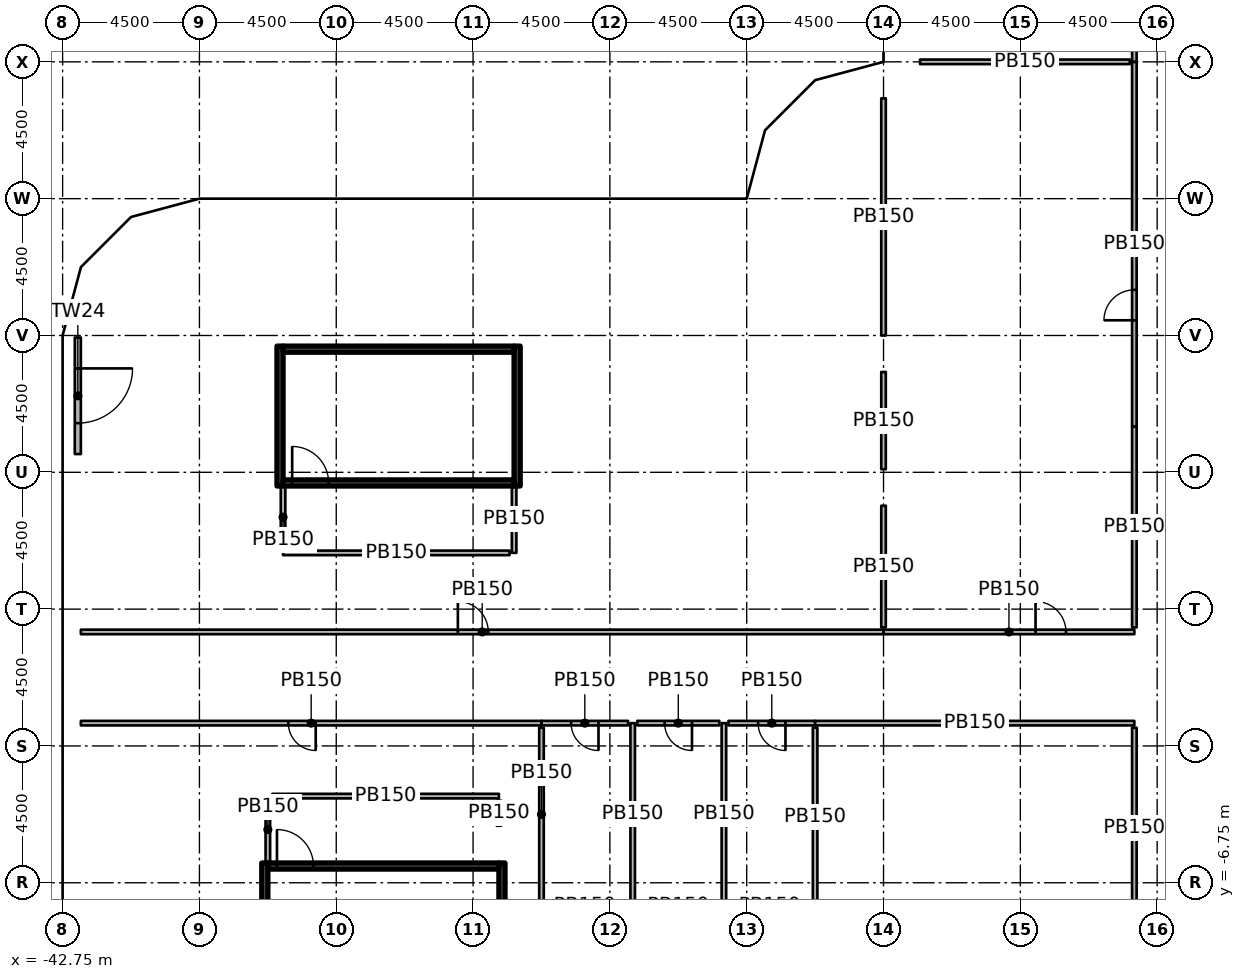
"""IFC4 building model, lengths in metres.
Left out: names, types, materials, properties, quantities, classifications, styles, units other than length and angle.
Written with IfcOpenShell. Run it as: python <this file> out.ifc"""

import sys

from ifc_helpers import new_model, si_unit, direction, frame, frame_2d, origin, origin_2d, place, context, subcontext, project, spatial, rectangle, extrude, element, fill, save


model = new_model("IFC4")
c1 = context("Model", 3, precision=1e-05, world=origin(), true_north=direction((0.0, 1.0)))
c2 = subcontext(c1, "Body", "Model", "MODEL_VIEW")
j1 = project(units=[si_unit("LENGTHUNIT", "METRE"), si_unit("PLANEANGLEUNIT", "RADIAN")], contexts=[c1])
p1 = place(None, origin())
s1 = spatial("IfcSite", under=j1, at=p1, CompositionType="ELEMENT")
p2 = place(p1, origin())
s2 = spatial("IfcBuilding", under=s1, at=p2, CompositionType="ELEMENT")
p3 = place(p2, frame((0.0, 0.0, 17.0)))
s3 = spatial("IfcBuildingStorey", under=s2, at=p3, CompositionType="ELEMENT", Elevation=17.0)
for number, where, z_axis, x_axis in (
    (1, (-42.15, 6.75, 0.0), (0.0, 0.0, 1.0), (1.0, 0.0, 0.0)),
    (2, (-37.65, 2.25, 0.0), (0.0, 0.0, 1.0), (1.0, 0.0, 0.0)),
    (3, (-38.25, 14.97, 0.0), (0.0, 0.0, 1.0), (1.0, 0.0, 0.0)),
    (4, (-33.11, -2.25, 0.0), (0.0, 0.0, 1.0), (1.0, 0.0, 0.0)),
    (5, (-33.11, 2.25, 0.0), (0.0, 0.0, 1.0), (1.0, 0.0, 0.0)),
    (6, (-28.908, -5.475, 0.0), (0.0, 0.0, 1.0), (1.0, 0.0, 0.0)),
    (7, (-28.908, 5.475, 0.0), (0.0, 0.0, 1.0), (1.0, 0.0, 0.0)),
    (8, (-24.75, -6.25, 0.0), (0.0, 0.0, 1.0), (1.0, 0.0, 0.0)),
    (9, (-24.75, 6.25, 0.0), (0.0, 0.0, 1.0), (1.0, 0.0, 0.0)),
    (10, (-24.75, 15.15, 0.0), (0.0, 0.0, 1.0), (1.0, 0.0, 0.0)),
    (11, (-20.25, -6.11, 0.0), (0.0, 0.0, 1.0), (1.0, 0.0, 0.0)),
    (12, (-20.25, 6.11, 0.0), (0.0, 0.0, 1.0), (1.0, 0.0, 0.0)),
    (13, (-20.25, 10.65, 0.0), (0.0, 0.0, 1.0), (1.0, 0.0, 0.0)),
    (14, (-19.65, 15.15, 0.0), (0.0, 0.0, 1.0), (1.0, 0.0, 0.0)),
    (15, (-15.75, -6.25, 0.0), (0.0, 0.0, 1.0), (1.0, 0.0, 0.0)),
    (16, (-15.75, 6.25, 0.0), (0.0, 0.0, 1.0), (1.0, 0.0, 0.0)),
    (17, (-15.15, 10.65, 0.0), (0.0, 0.0, 1.0), (1.0, 0.0, 0.0)),
    (18, (-15.15, 19.65, 0.0), (0.0, 0.0, 1.0), (1.0, 0.0, 0.0)),
    (19, (-10.75, -6.25, 0.0), (0.0, 0.0, 1.0), (1.0, 0.0, 0.0)),
    (20, (-10.75, 6.25, 0.0), (0.0, 0.0, 1.0), (1.0, 0.0, 0.0)),
    (21, (-10.65, 15.15, 0.0), (0.0, 0.0, 1.0), (1.0, 0.0, 0.0)),
    (22, (-6.25, -6.25, 0.0), (0.0, 0.0, 1.0), (1.0, 0.0, 0.0)),
    (23, (-6.25, 6.25, 0.0), (0.0, 0.0, 1.0), (1.0, 0.0, 0.0)),
    (24, (-6.25, 10.75, 0.0), (0.0, 0.0, 1.0), (1.0, 0.0, 0.0)),
    (25, (-6.25, 15.75, 0.0), (0.0, 0.0, 1.0), (1.0, 0.0, 0.0)),
    (26, (-6.25, 20.25, 0.0), (0.0, 0.0, 1.0), (1.0, 0.0, 0.0)),
):
    element("IfcColumn", number, at=place(p3, frame(where, z_axis=z_axis, x_axis=x_axis)), inside=s3, PredefinedType="COLUMN", context=c2, shape_type="SweptSolid", body=[
        extrude(rectangle(XDim=1.2, YDim=1.2, at=origin_2d()), origin(), (0.0, 0.0, 1.0), 4.55),
    ])
p4 = place(p3, frame((-42.25, 11.184, 0.0), z_axis=(0.0, 0.0, 1.0), x_axis=(0.0, -1.0, 0.0)))
e27 = element("IfcWall", 27, at=p4, inside=s3, PredefinedType="SOLIDWALL", context=c2, shape_type="SweptSolid", body=[
    extrude(rectangle(XDim=3.834, YDim=0.2, at=frame_2d((1.917, 0.0))), origin(), (0.0, 0.0, 1.0), 4.55),
])
p5 = place(p4, frame((1.017, 0.0, 0.0)))
e28 = element("IfcOpeningElement", 28, at=p5, cuts=e27, PredefinedType="OPENING", context=c2, shape_type="SweptSolid", body=[
    extrude(rectangle(XDim=1.8, YDim=2.4, at=frame_2d((0.9, 1.2))), frame((0.0, 0.11, 0.0), z_axis=(0.0, -1.0, 0.0), x_axis=(1.0, 0.0, 0.0)), (0.0, 0.0, 1.0), 0.22),
])
for number, where, z_axis, x_axis in (
    (29, (-36.1, -10.7, 0.0), (0.0, 0.0, 1.0), (0.0, 1.0, 0.0)),
    (30, (-28.3, -10.7, 0.0), (0.0, 0.0, 1.0), (0.0, 1.0, 0.0)),
):
    element("IfcWall", number, at=place(p3, frame(where, z_axis=z_axis, x_axis=x_axis)), inside=s3, PredefinedType="SHEAR", context=c2, shape_type="SweptSolid", body=[
        extrude(rectangle(XDim=4.6, YDim=0.2, at=frame_2d((2.3, 0.0))), origin(), (0.0, 0.0, 1.0), 4.55),
    ])
p6 = place(p3, frame((-36.0, -6.2, 0.0), z_axis=(0.0, 0.0, 1.0), x_axis=(1.0, 0.0, 0.0)))
e31 = element("IfcWall", 31, at=p6, inside=s3, PredefinedType="SHEAR", context=c2, shape_type="SweptSolid", body=[
    extrude(rectangle(XDim=7.6, YDim=0.2, at=frame_2d((3.8, 0.0))), origin(), (0.0, 0.0, 1.0), 4.55),
])
p7 = place(p6, frame((0.3, 0.0, 0.0)))
e32 = element("IfcOpeningElement", 32, at=p7, cuts=e31, PredefinedType="OPENING", context=c2, shape_type="SweptSolid", body=[
    extrude(rectangle(XDim=1.2, YDim=2.1, at=frame_2d((0.6, 1.05))), frame((0.0, 0.11, 0.0), z_axis=(0.0, -1.0, 0.0), x_axis=(1.0, 0.0, 0.0)), (0.0, 0.0, 1.0), 0.22),
])
for number, where, z_axis, x_axis in (
    (33, (-35.6, 6.3, 0.0), (0.0, 0.0, 1.0), (0.0, 1.0, 0.0)),
    (34, (-27.8, 6.3, 0.0), (0.0, 0.0, 1.0), (0.0, 1.0, 0.0)),
):
    element("IfcWall", number, at=place(p3, frame(where, z_axis=z_axis, x_axis=x_axis)), inside=s3, PredefinedType="SHEAR", context=c2, shape_type="SweptSolid", body=[
        extrude(rectangle(XDim=4.6, YDim=0.2, at=frame_2d((2.3, 0.0))), origin(), (0.0, 0.0, 1.0), 4.55),
    ])
p8 = place(p3, frame((-35.5, 6.4, 0.0), z_axis=(0.0, 0.0, 1.0), x_axis=(1.0, 0.0, 0.0)))
e35 = element("IfcWall", 35, at=p8, inside=s3, PredefinedType="SHEAR", context=c2, shape_type="SweptSolid", body=[
    extrude(rectangle(XDim=7.6, YDim=0.2, at=frame_2d((3.8, 0.0))), origin(), (0.0, 0.0, 1.0), 4.55),
])
p9 = place(p8, frame((0.3, 0.0, 0.0)))
e36 = element("IfcOpeningElement", 36, at=p9, cuts=e35, PredefinedType="OPENING", context=c2, shape_type="SweptSolid", body=[
    extrude(rectangle(XDim=1.2, YDim=2.1, at=frame_2d((0.6, 1.05))), frame((0.0, 0.11, 0.0), z_axis=(0.0, -1.0, 0.0), x_axis=(1.0, 0.0, 0.0)), (0.0, 0.0, 1.0), 0.22),
])
p10 = place(p3, frame((-35.5, 10.8, 0.0), z_axis=(0.0, 0.0, 1.0), x_axis=(1.0, 0.0, 0.0)))
e37 = element("IfcWall", 37, at=p10, inside=s3, PredefinedType="SHEAR", context=c2, shape_type="SweptSolid", body=[
    extrude(rectangle(XDim=7.6, YDim=0.2, at=frame_2d((3.8, 0.0))), origin(), (0.0, 0.0, 1.0), 4.55),
])
p11 = place(p3, frame((-36.0, -6.1, 0.0), z_axis=(0.0, 0.0, 1.0), x_axis=(0.0, 1.0, 0.0)))
e38 = element("IfcWall", 38, at=p11, inside=s3, PredefinedType="PARTITIONING", context=c2, shape_type="SweptSolid", body=[
    extrude(rectangle(XDim=2.2, YDim=0.15, at=frame_2d((1.1, 0.0))), origin(), (0.0, 0.0, 1.0), 4.55),
])
p12 = place(p3, frame((-35.85, -3.9, 0.0), z_axis=(0.0, 0.0, 1.0), x_axis=(1.0, 0.0, 0.0)))
e39 = element("IfcWall", 39, at=p12, inside=s3, PredefinedType="PARTITIONING", context=c2, shape_type="SweptSolid", body=[
    extrude(rectangle(XDim=7.45, YDim=0.15, at=frame_2d((3.725, 0.0))), origin(), (0.0, 0.0, 1.0), 4.55),
])
p13 = place(p3, frame((-28.4, -4.05, 0.0), z_axis=(0.0, 0.0, 1.0), x_axis=(0.0, -1.0, 0.0)))
e40 = element("IfcWall", 40, at=p13, inside=s3, PredefinedType="PARTITIONING", context=c2, shape_type="SweptSolid", body=[
    extrude(rectangle(XDim=0.825, YDim=0.15, at=frame_2d((0.413, 0.0))), origin(), (0.0, 0.0, 1.0), 4.55),
])
p14 = place(p3, frame((-27.9, 6.3, 0.0), z_axis=(0.0, 0.0, 1.0), x_axis=(0.0, -1.0, 0.0)))
e41 = element("IfcWall", 41, at=p14, inside=s3, PredefinedType="PARTITIONING", context=c2, shape_type="SweptSolid", body=[
    extrude(rectangle(XDim=2.2, YDim=0.15, at=frame_2d((1.1, 0.0))), origin(), (0.0, 0.0, 1.0), 4.55),
])
p15 = place(p3, frame((-28.05, 4.1, 0.0), z_axis=(0.0, 0.0, 1.0), x_axis=(-1.0, 0.0, 0.0)))
e42 = element("IfcWall", 42, at=p15, inside=s3, PredefinedType="PARTITIONING", context=c2, shape_type="SweptSolid", body=[
    extrude(rectangle(XDim=7.45, YDim=0.15, at=frame_2d((3.725, 0.0))), origin(), (0.0, 0.0, 1.0), 4.55),
])
p16 = place(p3, frame((-35.5, 4.25, 0.0), z_axis=(0.0, 0.0, 1.0), x_axis=(0.0, 1.0, 0.0)))
e43 = element("IfcWall", 43, at=p16, inside=s3, PredefinedType="PARTITIONING", context=c2, shape_type="SweptSolid", body=[
    extrude(rectangle(XDim=2.05, YDim=0.15, at=frame_2d((1.025, 0.0))), origin(), (0.0, 0.0, 1.0), 4.55),
])
p17 = place(p3, frame((-24.0, -1.5, 0.0), z_axis=(0.0, 0.0, 1.0), x_axis=(0.0, -1.0, 0.0)))
e44 = element("IfcWall", 44, at=p17, inside=s3, PredefinedType="PARTITIONING", context=c2, shape_type="SweptSolid", body=[
    extrude(rectangle(XDim=6.0, YDim=0.15, at=frame_2d((3.0, 0.0))), origin(), (0.0, 0.0, 1.0), 4.55),
])
p18 = place(p3, frame((-24.15, -1.5, 0.0), z_axis=(0.0, 0.0, 1.0), x_axis=(-1.0, 0.0, 0.0)))
e45 = element("IfcWall", 45, at=p18, inside=s3, PredefinedType="PARTITIONING", context=c2, shape_type="SweptSolid", body=[
    extrude(rectangle(XDim=2.85, YDim=0.15, at=frame_2d((1.425, 0.0))), origin(), (0.0, 0.0, 1.0), 4.55),
])
p19 = place(p18, frame((0.975, 0.0, 0.0)))
e46 = element("IfcOpeningElement", 46, at=p19, cuts=e45, PredefinedType="OPENING", context=c2, shape_type="SweptSolid", body=[
    extrude(rectangle(XDim=0.9, YDim=2.1, at=frame_2d((0.45, 1.05))), frame((0.0, 0.085, 0.0), z_axis=(0.0, -1.0, 0.0), x_axis=(1.0, 0.0, 0.0)), (0.0, 0.0, 1.0), 0.17),
])
p20 = place(p3, frame((-27.0, -7.35, 0.0), z_axis=(0.0, 0.0, 1.0), x_axis=(0.0, 1.0, 0.0)))
e47 = element("IfcWall", 47, at=p20, inside=s3, PredefinedType="PARTITIONING", context=c2, shape_type="SweptSolid", body=[
    extrude(rectangle(XDim=5.7, YDim=0.15, at=frame_2d((2.85, 0.0))), origin(), (0.0, 0.0, 1.0), 4.55),
])
p21 = place(p3, frame((-21.0, -1.5, 0.0), z_axis=(0.0, 0.0, 1.0), x_axis=(0.0, -1.0, 0.0)))
e48 = element("IfcWall", 48, at=p21, inside=s3, PredefinedType="PARTITIONING", context=c2, shape_type="SweptSolid", body=[
    extrude(rectangle(XDim=6.0, YDim=0.15, at=frame_2d((3.0, 0.0))), origin(), (0.0, 0.0, 1.0), 4.55),
])
p22 = place(p3, frame((-21.15, -1.5, 0.0), z_axis=(0.0, 0.0, 1.0), x_axis=(-1.0, 0.0, 0.0)))
e49 = element("IfcWall", 49, at=p22, inside=s3, PredefinedType="PARTITIONING", context=c2, shape_type="SweptSolid", body=[
    extrude(rectangle(XDim=2.7, YDim=0.15, at=frame_2d((1.35, 0.0))), origin(), (0.0, 0.0, 1.0), 4.55),
])
p23 = place(p22, frame((0.9, 0.0, 0.0)))
e50 = element("IfcOpeningElement", 50, at=p23, cuts=e49, PredefinedType="OPENING", context=c2, shape_type="SweptSolid", body=[
    extrude(rectangle(XDim=0.9, YDim=2.1, at=frame_2d((0.45, 1.05))), frame((0.0, 0.085, 0.0), z_axis=(0.0, -1.0, 0.0), x_axis=(1.0, 0.0, 0.0)), (0.0, 0.0, 1.0), 0.17),
])
p24 = place(p3, frame((-18.0, -1.5, 0.0), z_axis=(0.0, 0.0, 1.0), x_axis=(-1.0, 0.0, 0.0)))
e51 = element("IfcWall", 51, at=p24, inside=s3, PredefinedType="PARTITIONING", context=c2, shape_type="SweptSolid", body=[
    extrude(rectangle(XDim=2.85, YDim=0.15, at=frame_2d((1.425, 0.0))), origin(), (0.0, 0.0, 1.0), 4.55),
])
p25 = place(p24, frame((0.975, 0.0, 0.0)))
e52 = element("IfcOpeningElement", 52, at=p25, cuts=e51, PredefinedType="OPENING", context=c2, shape_type="SweptSolid", body=[
    extrude(rectangle(XDim=0.9, YDim=2.1, at=frame_2d((0.45, 1.05))), frame((0.0, 0.085, 0.0), z_axis=(0.0, -1.0, 0.0), x_axis=(1.0, 0.0, 0.0)), (0.0, 0.0, 1.0), 0.17),
])
p26 = place(p3, frame((-18.0, -1.65, 0.0), z_axis=(0.0, 0.0, 1.0), x_axis=(0.0, -1.0, 0.0)))
e53 = element("IfcWall", 53, at=p26, inside=s3, PredefinedType="PARTITIONING", context=c2, shape_type="SweptSolid", body=[
    extrude(rectangle(XDim=5.85, YDim=0.15, at=frame_2d((2.925, 0.0))), origin(), (0.0, 0.0, 1.0), 4.55),
])
p27 = place(p3, frame((-7.5, 8.25, 0.0), z_axis=(0.0, 0.0, 1.0), x_axis=(0.0, 1.0, 0.0)))
e54 = element("IfcWall", 54, at=p27, inside=s3, PredefinedType="PARTITIONING", context=c2, shape_type="SweptSolid", body=[
    extrude(rectangle(XDim=12.0, YDim=0.15, at=frame_2d((6.0, 0.0))), origin(), (0.0, 0.0, 1.0), 4.55),
])
p28 = place(p27, frame((3.5, 0.0, 0.0)))
e55 = element("IfcOpeningElement", 55, at=p28, cuts=e54, PredefinedType="OPENING", context=c2, shape_type="SweptSolid", body=[
    extrude(rectangle(XDim=1.0, YDim=2.1, at=frame_2d((0.5, 1.05))), frame((0.0, 0.085, 0.0), z_axis=(0.0, -1.0, 0.0), x_axis=(1.0, 0.0, 0.0)), (0.0, 0.0, 1.0), 0.17),
])
p29 = place(p3, frame((-7.5, 20.25, 0.0), z_axis=(0.0, 0.0, 1.0), x_axis=(0.0, 1.0, 0.0)))
e56 = element("IfcWall", 56, at=p29, inside=s3, PredefinedType="PARTITIONING", context=c2, shape_type="SweptSolid", body=[
    extrude(rectangle(XDim=9.75, YDim=0.15, at=frame_2d((4.875, 0.0))), origin(), (0.0, 0.0, 1.0), 4.55),
])
p30 = place(p29, frame((2.75, 0.0, 0.0)))
e57 = element("IfcOpeningElement", 57, at=p30, cuts=e56, PredefinedType="OPENING", context=c2, shape_type="SweptSolid", body=[
    extrude(rectangle(XDim=0.9, YDim=2.1, at=frame_2d((0.45, 1.05))), frame((0.0, 0.085, 0.0), z_axis=(0.0, -1.0, 0.0), x_axis=(1.0, 0.0, 0.0)), (0.0, 0.0, 1.0), 0.17),
])
p31 = place(p3, frame((-15.75, 1.5, 0.0), z_axis=(0.0, 0.0, 1.0), x_axis=(1.0, 0.0, 0.0)))
e58 = element("IfcWall", 58, at=p31, inside=s3, PredefinedType="PARTITIONING", context=c2, shape_type="SweptSolid", body=[
    extrude(rectangle(XDim=8.25, YDim=0.15, at=frame_2d((4.125, 0.0))), origin(), (0.0, 0.0, 1.0), 4.55),
])
p32 = place(p31, frame((5.0, 0.0, 0.0)))
e59 = element("IfcOpeningElement", 59, at=p32, cuts=e58, PredefinedType="OPENING", context=c2, shape_type="SweptSolid", body=[
    extrude(rectangle(XDim=1.0, YDim=2.1, at=frame_2d((0.5, 1.05))), frame((0.0, 0.085, 0.0), z_axis=(0.0, -1.0, 0.0), x_axis=(1.0, 0.0, 0.0)), (0.0, 0.0, 1.0), 0.17),
])
p33 = place(p3, frame((-42.15, 1.5, 0.0), z_axis=(0.0, 0.0, 1.0), x_axis=(1.0, 0.0, 0.0)))
e60 = element("IfcWall", 60, at=p33, inside=s3, PredefinedType="PARTITIONING", context=c2, shape_type="SweptSolid", body=[
    extrude(rectangle(XDim=26.4, YDim=0.15, at=frame_2d((13.2, 0.0))), origin(), (0.0, 0.0, 1.0), 4.55),
])
p34 = place(p33, frame((12.4, 0.0, 0.0)))
e61 = element("IfcOpeningElement", 61, at=p34, cuts=e60, PredefinedType="OPENING", context=c2, shape_type="SweptSolid", body=[
    extrude(rectangle(XDim=1.0, YDim=2.1, at=frame_2d((0.5, 1.05))), frame((0.0, 0.085, 0.0), z_axis=(0.0, -1.0, 0.0), x_axis=(1.0, 0.0, 0.0)), (0.0, 0.0, 1.0), 0.17),
])
p35 = place(p3, frame((-7.5, -1.5, 0.0), z_axis=(0.0, 0.0, 1.0), x_axis=(-1.0, 0.0, 0.0)))
e62 = element("IfcWall", 62, at=p35, inside=s3, PredefinedType="PARTITIONING", context=c2, shape_type="SweptSolid", body=[
    extrude(rectangle(XDim=10.5, YDim=0.15, at=frame_2d((5.25, 0.0))), origin(), (0.0, 0.0, 1.0), 4.55),
])
p36 = place(p3, frame((-27.0, -1.5, 0.0), z_axis=(0.0, 0.0, 1.0), x_axis=(-1.0, 0.0, 0.0)))
e63 = element("IfcWall", 63, at=p36, inside=s3, PredefinedType="PARTITIONING", context=c2, shape_type="SweptSolid", body=[
    extrude(rectangle(XDim=15.15, YDim=0.15, at=frame_2d((7.575, 0.0))), origin(), (0.0, 0.0, 1.0), 4.55),
])
p37 = place(p36, frame((7.425, 0.0, 0.0)))
e64 = element("IfcOpeningElement", 64, at=p37, cuts=e63, PredefinedType="OPENING", context=c2, shape_type="SweptSolid", body=[
    extrude(rectangle(XDim=0.9, YDim=2.1, at=frame_2d((0.45, 1.05))), frame((0.0, 0.085, 0.0), z_axis=(0.0, -1.0, 0.0), x_axis=(1.0, 0.0, 0.0)), (0.0, 0.0, 1.0), 0.17),
])
p38 = place(p3, frame((-15.75, 1.65, 0.0), z_axis=(0.0, 0.0, 1.0), x_axis=(0.0, 1.0, 0.0)))
e65 = element("IfcWall", 65, at=p38, inside=s3, PredefinedType="PARTITIONING", context=c2, shape_type="SweptSolid", body=[
    extrude(rectangle(XDim=4.0, YDim=0.15, at=frame_2d((2.0, 0.0))), origin(), (0.0, 0.0, 1.0), 4.55),
])
p39 = place(p3, frame((-15.75, 6.85, 0.0), z_axis=(0.0, 0.0, 1.0), x_axis=(0.0, 1.0, 0.0)))
e66 = element("IfcWall", 66, at=p39, inside=s3, PredefinedType="PARTITIONING", context=c2, shape_type="SweptSolid", body=[
    extrude(rectangle(XDim=3.2, YDim=0.15, at=frame_2d((1.6, 0.0))), origin(), (0.0, 0.0, 1.0), 4.55),
])
p40 = place(p3, frame((-15.75, 11.25, 0.0), z_axis=(0.0, 0.0, 1.0), x_axis=(0.0, 1.0, 0.0)))
e67 = element("IfcWall", 67, at=p40, inside=s3, PredefinedType="PARTITIONING", context=c2, shape_type="SweptSolid", body=[
    extrude(rectangle(XDim=7.8, YDim=0.15, at=frame_2d((3.9, 0.0))), origin(), (0.0, 0.0, 1.0), 4.55),
])
p41 = place(p3, frame((-14.55, 20.25, 0.0), z_axis=(0.0, 0.0, 1.0), x_axis=(1.0, 0.0, 0.0)))
e68 = element("IfcWall", 68, at=p41, inside=s3, PredefinedType="PARTITIONING", context=c2, shape_type="SweptSolid", body=[
    extrude(rectangle(XDim=6.9, YDim=0.15, at=frame_2d((3.45, 0.0))), origin(), (0.0, 0.0, 1.0), 4.55),
])
for number, where, z_axis, x_axis in (
    (69, (-7.5, 8.25, 0.0), (0.0, 0.0, 1.0), (0.0, -1.0, 0.0)),
    (70, (-7.5, -1.65, 0.0), (0.0, 0.0, 1.0), (0.0, -1.0, 0.0)),
):
    element("IfcWall", number, at=place(p3, frame(where, z_axis=z_axis, x_axis=x_axis)), inside=s3, PredefinedType="PARTITIONING", context=c2, shape_type="SweptSolid", body=[
        extrude(rectangle(XDim=6.6, YDim=0.15, at=frame_2d((3.3, 0.0))), origin(), (0.0, 0.0, 1.0), 4.55),
    ])
p42 = place(p5, origin())
e71 = element("IfcDoor", 71, at=p42, inside=s3, OperationType="SINGLE_SWING_LEFT", PredefinedType="DOOR", context=c2, shape_type="SweptSolid", body=[
    extrude(rectangle(XDim=1.8, YDim=2.4, at=frame_2d((0.9, 1.2))), frame((0.0, 0.025, 0.0), z_axis=(0.0, -1.0, 0.0), x_axis=(1.0, 0.0, 0.0)), (0.0, 0.0, 1.0), 0.05),
])
fill(e28, e71)
p43 = place(p7, origin())
e72 = element("IfcDoor", 72, at=p43, inside=s3, OperationType="SINGLE_SWING_RIGHT", PredefinedType="DOOR", context=c2, shape_type="SweptSolid", body=[
    extrude(rectangle(XDim=1.2, YDim=2.1, at=frame_2d((0.6, 1.05))), frame((0.0, 0.025, 0.0), z_axis=(0.0, -1.0, 0.0), x_axis=(1.0, 0.0, 0.0)), (0.0, 0.0, 1.0), 0.05),
])
fill(e32, e72)
p44 = place(p9, origin())
e73 = element("IfcDoor", 73, at=p44, inside=s3, OperationType="SINGLE_SWING_RIGHT", PredefinedType="DOOR", context=c2, shape_type="SweptSolid", body=[
    extrude(rectangle(XDim=1.2, YDim=2.1, at=frame_2d((0.6, 1.05))), frame((0.0, 0.025, 0.0), z_axis=(0.0, -1.0, 0.0), x_axis=(1.0, 0.0, 0.0)), (0.0, 0.0, 1.0), 0.05),
])
fill(e36, e73)
p45 = place(p19, origin())
e74 = element("IfcDoor", 74, at=p45, inside=s3, OperationType="SINGLE_SWING_LEFT", PredefinedType="DOOR", context=c2, shape_type="SweptSolid", body=[
    extrude(rectangle(XDim=0.9, YDim=2.1, at=frame_2d((0.45, 1.05))), frame((0.0, 0.025, 0.0), z_axis=(0.0, -1.0, 0.0), x_axis=(1.0, 0.0, 0.0)), (0.0, 0.0, 1.0), 0.05),
])
fill(e46, e74)
p46 = place(p23, origin())
e75 = element("IfcDoor", 75, at=p46, inside=s3, OperationType="SINGLE_SWING_LEFT", PredefinedType="DOOR", context=c2, shape_type="SweptSolid", body=[
    extrude(rectangle(XDim=0.9, YDim=2.1, at=frame_2d((0.45, 1.05))), frame((0.0, 0.025, 0.0), z_axis=(0.0, -1.0, 0.0), x_axis=(1.0, 0.0, 0.0)), (0.0, 0.0, 1.0), 0.05),
])
fill(e50, e75)
p47 = place(p25, origin())
e76 = element("IfcDoor", 76, at=p47, inside=s3, OperationType="SINGLE_SWING_LEFT", PredefinedType="DOOR", context=c2, shape_type="SweptSolid", body=[
    extrude(rectangle(XDim=0.9, YDim=2.1, at=frame_2d((0.45, 1.05))), frame((0.0, 0.025, 0.0), z_axis=(0.0, -1.0, 0.0), x_axis=(1.0, 0.0, 0.0)), (0.0, 0.0, 1.0), 0.05),
])
fill(e52, e76)
p48 = place(p28, origin())
e77 = element("IfcDoor", 77, at=p48, inside=s3, OperationType="SINGLE_SWING_LEFT", PredefinedType="DOOR", context=c2, shape_type="SweptSolid", body=[
    extrude(rectangle(XDim=1.0, YDim=2.1, at=frame_2d((0.5, 1.05))), frame((0.0, 0.025, 0.0), z_axis=(0.0, -1.0, 0.0), x_axis=(1.0, 0.0, 0.0)), (0.0, 0.0, 1.0), 0.05),
])
fill(e55, e77)
p49 = place(p32, origin())
e78 = element("IfcDoor", 78, at=p49, inside=s3, OperationType="SINGLE_SWING_LEFT", PredefinedType="DOOR", context=c2, shape_type="SweptSolid", body=[
    extrude(rectangle(XDim=1.0, YDim=2.1, at=frame_2d((0.5, 1.05))), frame((0.0, 0.025, 0.0), z_axis=(0.0, -1.0, 0.0), x_axis=(1.0, 0.0, 0.0)), (0.0, 0.0, 1.0), 0.05),
])
fill(e59, e78)
p50 = place(p34, origin())
e79 = element("IfcDoor", 79, at=p50, inside=s3, OperationType="SINGLE_SWING_LEFT", PredefinedType="DOOR", context=c2, shape_type="SweptSolid", body=[
    extrude(rectangle(XDim=1.0, YDim=2.1, at=frame_2d((0.5, 1.05))), frame((0.0, 0.025, 0.0), z_axis=(0.0, -1.0, 0.0), x_axis=(1.0, 0.0, 0.0)), (0.0, 0.0, 1.0), 0.05),
])
fill(e61, e79)
p51 = place(p37, origin())
e80 = element("IfcDoor", 80, at=p51, inside=s3, OperationType="SINGLE_SWING_LEFT", PredefinedType="DOOR", context=c2, shape_type="SweptSolid", body=[
    extrude(rectangle(XDim=0.9, YDim=2.1, at=frame_2d((0.45, 1.05))), frame((0.0, 0.025, 0.0), z_axis=(0.0, -1.0, 0.0), x_axis=(1.0, 0.0, 0.0)), (0.0, 0.0, 1.0), 0.05),
])
fill(e64, e80)
save(model, sys.argv[1])
